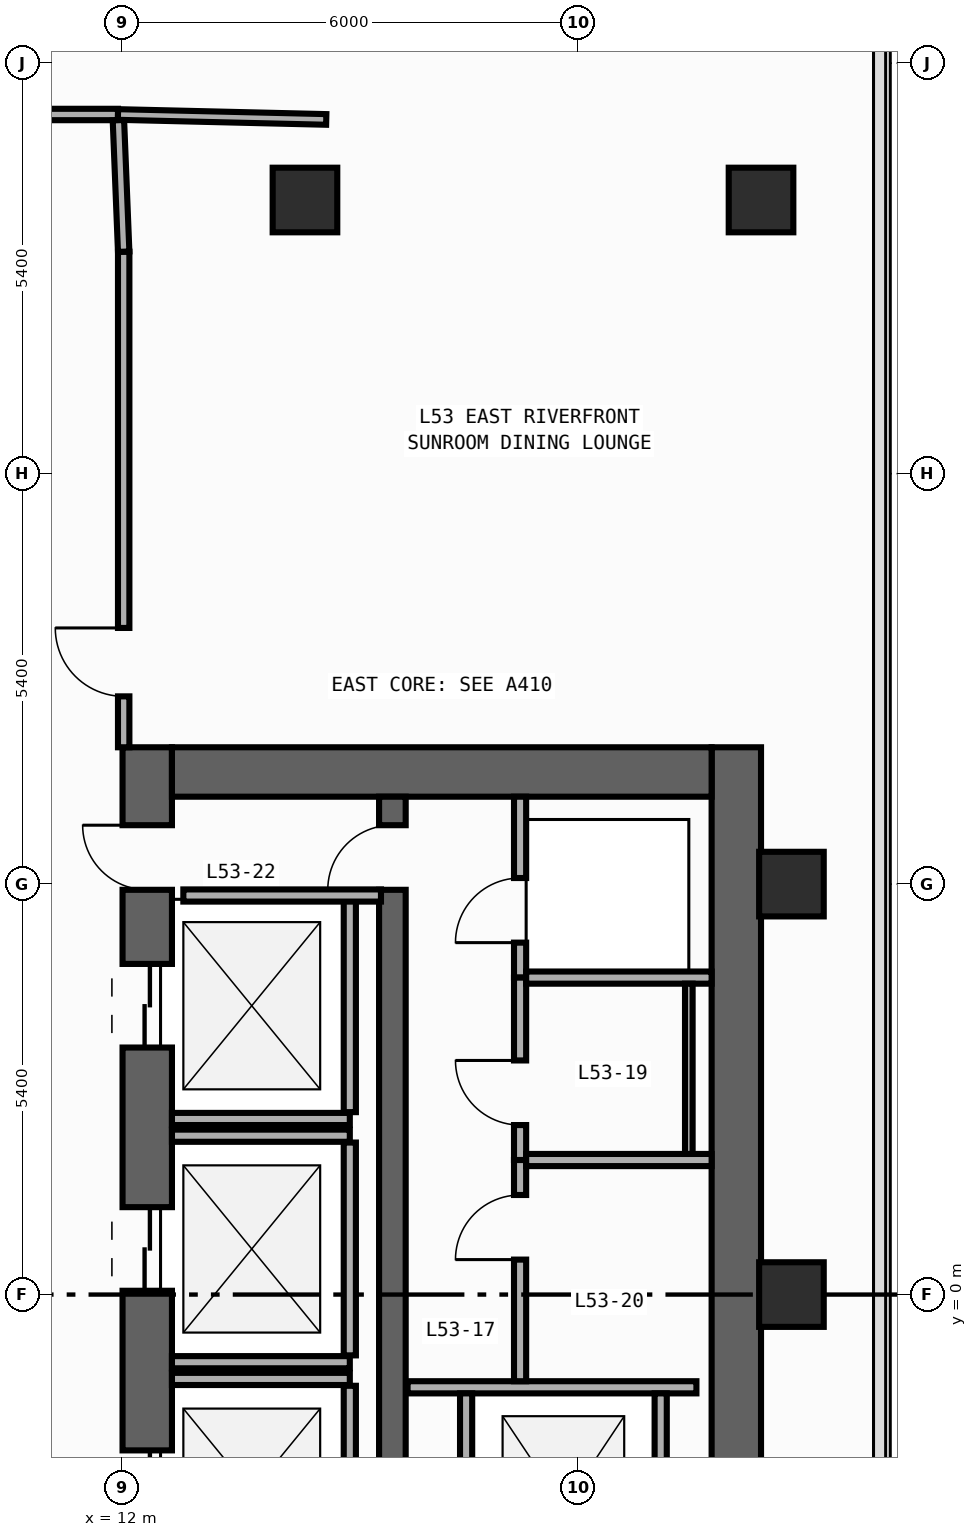
"""IFC4 building model, lengths in metres.
Left out: names, types, materials, properties, quantities, classifications, styles, units other than length and angle.
Written with IfcOpenShell. Run it as: python <this file> out.ifc"""

import sys

from ifc_helpers import new_model, si_unit, direction, frame, frame_2d, origin, origin_2d, place, context, subcontext, project, spatial, rectangle, extrude, element, fill, save


model = new_model("IFC4")
c1 = context("Model", 3, precision=1e-05, world=origin(), true_north=direction((0.0, 1.0)))
c2 = subcontext(c1, "Body", "Model", "MODEL_VIEW")
j1 = project(units=[si_unit("LENGTHUNIT", "METRE"), si_unit("PLANEANGLEUNIT", "RADIAN")], contexts=[c1])
p1 = place(None, origin())
s1 = spatial("IfcSite", under=j1, at=p1, CompositionType="ELEMENT")
p2 = place(p1, origin())
s2 = spatial("IfcBuilding", under=s1, at=p2, CompositionType="ELEMENT")
p3 = place(p2, frame((0.0, 0.0, 229.6)))
s3 = spatial("IfcBuildingStorey", under=s2, at=p3, CompositionType="ELEMENT", Elevation=229.6)
p4 = place(p3, frame((12.325, -19.8, 0.0), z_axis=(0.0, 0.0, 1.0), x_axis=(0.0, 1.0, 0.0)))
e1 = element("IfcWall", 1, at=p4, inside=s3, PredefinedType="SHEAR", context=c2, shape_type="SweptSolid", body=[
    extrude(rectangle(XDim=27.0, YDim=0.65, at=frame_2d((13.5, 0.0))), origin(), (0.0, 0.0, 1.0), 3.34),
])
p5 = place(p4, frame((23.05, 0.0, 0.0)))
e2 = element("IfcOpeningElement", 2, at=p5, cuts=e1, PredefinedType="OPENING", context=c2, shape_type="SweptSolid", body=[
    extrude(rectangle(XDim=1.1, YDim=2.2, at=frame_2d((0.55, 1.1))), frame((0.0, 0.335, 0.0), z_axis=(0.0, -1.0, 0.0), x_axis=(1.0, 0.0, 0.0)), (0.0, 0.0, 1.0), 0.67),
])
p6 = place(p4, frame((19.85, 0.0, 0.0)))
e3 = element("IfcOpeningElement", 3, at=p6, cuts=e1, PredefinedType="OPENING", context=c2, shape_type="SweptSolid", body=[
    extrude(rectangle(XDim=1.1, YDim=2.2, at=frame_2d((0.55, 1.1))), frame((0.0, 0.335, 0.0), z_axis=(0.0, -1.0, 0.0), x_axis=(1.0, 0.0, 0.0)), (0.0, 0.0, 1.0), 0.67),
])
p7 = place(p4, frame((16.65, 0.0, 0.0)))
e4 = element("IfcOpeningElement", 4, at=p7, cuts=e1, PredefinedType="OPENING", context=c2, shape_type="SweptSolid", body=[
    extrude(rectangle(XDim=1.1, YDim=2.2, at=frame_2d((0.55, 1.1))), frame((0.0, 0.335, 0.0), z_axis=(0.0, -1.0, 0.0), x_axis=(1.0, 0.0, 0.0)), (0.0, 0.0, 1.0), 0.67),
])
p8 = place(p4, frame((10.175, 0.0, 0.0)))
e5 = element("IfcOpeningElement", 5, at=p8, cuts=e1, PredefinedType="OPENING", context=c2, shape_type="SweptSolid", body=[
    extrude(rectangle(XDim=0.85, YDim=2.1, at=frame_2d((0.425, 1.05))), frame((0.0, 0.335, 0.0), z_axis=(0.0, -1.0, 0.0), x_axis=(1.0, 0.0, 0.0)), (0.0, 0.0, 1.0), 0.67),
])
p9 = place(p4, frame((12.725, 0.0, 0.0)))
e6 = element("IfcOpeningElement", 6, at=p9, cuts=e1, PredefinedType="OPENING", context=c2, shape_type="SweptSolid", body=[
    extrude(rectangle(XDim=1.15, YDim=2.2, at=frame_2d((0.575, 1.1))), frame((0.0, 0.335, 0.0), z_axis=(0.0, -1.0, 0.0), x_axis=(1.0, 0.0, 0.0)), (0.0, 0.0, 1.0), 0.67),
])
p10 = place(p4, frame((25.125, 0.0, 0.0)))
e7 = element("IfcOpeningElement", 7, at=p10, cuts=e1, PredefinedType="OPENING", context=c2, shape_type="SweptSolid", body=[
    extrude(rectangle(XDim=0.85, YDim=2.1, at=frame_2d((0.425, 1.05))), frame((0.0, 0.335, 0.0), z_axis=(0.0, -1.0, 0.0), x_axis=(1.0, 0.0, 0.0)), (0.0, 0.0, 1.0), 0.67),
])
p11 = place(p3, frame((20.075, -19.8, 0.0), z_axis=(0.0, 0.0, 1.0), x_axis=(0.0, 1.0, 0.0)))
e8 = element("IfcWall", 8, at=p11, inside=s3, PredefinedType="SHEAR", context=c2, shape_type="SweptSolid", body=[
    extrude(rectangle(XDim=27.0, YDim=0.65, at=frame_2d((13.5, 0.0))), origin(), (0.0, 0.0, 1.0), 3.34),
])
p12 = place(p3, frame((12.65, 6.875, 0.0), z_axis=(0.0, 0.0, 1.0), x_axis=(1.0, 0.0, 0.0)))
e9 = element("IfcWall", 9, at=p12, inside=s3, PredefinedType="SHEAR", context=c2, shape_type="SweptSolid", body=[
    extrude(rectangle(XDim=7.1, YDim=0.65, at=frame_2d((3.55, 0.0))), origin(), (0.0, 0.0, 1.0), 3.34),
])
p13 = place(p3, frame((15.55, -19.15, 0.0), z_axis=(0.0, 0.0, 1.0), x_axis=(0.0, 1.0, 0.0)))
e10 = element("IfcWall", 10, at=p13, inside=s3, PredefinedType="SHEAR", context=c2, shape_type="SweptSolid", body=[
    extrude(rectangle(XDim=25.7, YDim=0.35, at=frame_2d((12.85, 0.0))), origin(), (0.0, 0.0, 1.0), 3.34),
])
p14 = place(p13, frame((12.075, 0.0, 0.0)))
e11 = element("IfcOpeningElement", 11, at=p14, cuts=e10, PredefinedType="OPENING", context=c2, shape_type="SweptSolid", body=[
    extrude(rectangle(XDim=1.15, YDim=2.2, at=frame_2d((0.575, 1.1))), frame((0.0, 0.185, 0.0), z_axis=(0.0, -1.0, 0.0), x_axis=(1.0, 0.0, 0.0)), (0.0, 0.0, 1.0), 0.37),
])
p15 = place(p13, frame((24.475, 0.0, 0.0)))
e12 = element("IfcOpeningElement", 12, at=p15, cuts=e10, PredefinedType="OPENING", context=c2, shape_type="SweptSolid", body=[
    extrude(rectangle(XDim=0.85, YDim=2.1, at=frame_2d((0.425, 1.05))), frame((0.0, 0.185, 0.0), z_axis=(0.0, -1.0, 0.0), x_axis=(1.0, 0.0, 0.0)), (0.0, 0.0, 1.0), 0.37),
])
for number, where, z_axis, x_axis in (
    (13, (20.4, 14.4, 0.0), (0.0, 0.0, 1.0), (1.0, 0.0, 0.0)),
    (14, (14.4, 14.4, 0.0), (0.0, 0.0, 1.0), (1.0, 0.0, 0.0)),
    (15, (20.8, 0.0, 0.0), (0.0, 0.0, 1.0), (1.0, 0.0, 0.0)),
    (16, (20.8, 5.4, 0.0), (0.0, 0.0, 1.0), (1.0, 0.0, 0.0)),
):
    element("IfcColumn", number, at=place(p3, frame(where, z_axis=z_axis, x_axis=x_axis)), inside=s3, PredefinedType="COLUMN", context=c2, shape_type="SweptSolid", body=[
        extrude(rectangle(XDim=0.85, YDim=0.85, at=origin_2d()), origin(), (0.0, 0.0, 1.0), 3.6),
    ])
p16 = place(p3, frame((12.65, 2.31, 0.0), z_axis=(0.0, 0.0, 1.0), x_axis=(1.0, 0.0, 0.0)))
e17 = element("IfcWall", 17, at=p16, inside=s3, PredefinedType="STANDARD", context=c2, shape_type="SweptSolid", body=[
    extrude(rectangle(XDim=2.34, YDim=0.16, at=frame_2d((1.17, 0.0))), origin(), (0.0, 0.0, 1.0), 3.34),
])
p17 = place(p3, frame((14.99, 2.4, 0.0), z_axis=(0.0, 0.0, 1.0), x_axis=(0.0, 1.0, 0.0)))
e18 = element("IfcWall", 18, at=p17, inside=s3, PredefinedType="STANDARD", context=c2, shape_type="SweptSolid", body=[
    extrude(rectangle(XDim=2.8, YDim=0.16, at=frame_2d((1.4, 0.0))), origin(), (0.0, 0.0, 1.0), 3.34),
])
for number, where, z_axis, x_axis in (
    (19, (12.65, -0.89, 0.0), (0.0, 0.0, 1.0), (1.0, 0.0, 0.0)),
    (20, (12.65, 2.09, 0.0), (0.0, 0.0, 1.0), (1.0, 0.0, 0.0)),
):
    element("IfcWall", number, at=place(p3, frame(where, z_axis=z_axis, x_axis=x_axis)), inside=s3, PredefinedType="STANDARD", context=c2, shape_type="SweptSolid", body=[
        extrude(rectangle(XDim=2.34, YDim=0.16, at=frame_2d((1.17, 0.0))), origin(), (0.0, 0.0, 1.0), 3.34),
    ])
p18 = place(p3, frame((14.99, -0.8, 0.0), z_axis=(0.0, 0.0, 1.0), x_axis=(0.0, 1.0, 0.0)))
e21 = element("IfcWall", 21, at=p18, inside=s3, PredefinedType="STANDARD", context=c2, shape_type="SweptSolid", body=[
    extrude(rectangle(XDim=2.8, YDim=0.16, at=frame_2d((1.4, 0.0))), origin(), (0.0, 0.0, 1.0), 3.34),
])
p19 = place(p3, frame((12.65, -1.11, 0.0), z_axis=(0.0, 0.0, 1.0), x_axis=(1.0, 0.0, 0.0)))
e22 = element("IfcWall", 22, at=p19, inside=s3, PredefinedType="STANDARD", context=c2, shape_type="SweptSolid", body=[
    extrude(rectangle(XDim=2.34, YDim=0.16, at=frame_2d((1.17, 0.0))), origin(), (0.0, 0.0, 1.0), 3.34),
])
p20 = place(p3, frame((14.99, -4.0, 0.0), z_axis=(0.0, 0.0, 1.0), x_axis=(0.0, 1.0, 0.0)))
e23 = element("IfcWall", 23, at=p20, inside=s3, PredefinedType="STANDARD", context=c2, shape_type="SweptSolid", body=[
    extrude(rectangle(XDim=2.8, YDim=0.16, at=frame_2d((1.4, 0.0))), origin(), (0.0, 0.0, 1.0), 3.34),
])
p21 = place(p3, frame((15.75, -1.22, 0.0), z_axis=(0.0, 0.0, 1.0), x_axis=(1.0, 0.0, 0.0)))
e24 = element("IfcWall", 24, at=p21, inside=s3, PredefinedType="STANDARD", context=c2, shape_type="SweptSolid", body=[
    extrude(rectangle(XDim=3.8, YDim=0.16, at=frame_2d((1.9, 0.0))), origin(), (0.0, 0.0, 1.0), 3.34),
])
for number, where, z_axis, x_axis in (
    (25, (16.52, -4.28, 0.0), (0.0, 0.0, 1.0), (0.0, 1.0, 0.0)),
    (26, (19.08, -4.28, 0.0), (0.0, 0.0, 1.0), (0.0, 1.0, 0.0)),
):
    element("IfcWall", number, at=place(p3, frame(where, z_axis=z_axis, x_axis=x_axis)), inside=s3, PredefinedType="STANDARD", context=c2, shape_type="SweptSolid", body=[
        extrude(rectangle(XDim=2.98, YDim=0.16, at=frame_2d((1.49, 0.0))), origin(), (0.0, 0.0, 1.0), 3.34),
    ])
p22 = place(p3, frame((12.8, 5.25, 0.0), z_axis=(0.0, 0.0, 1.0), x_axis=(1.0, 0.0, 0.0)))
e27 = element("IfcWall", 27, at=p22, inside=s3, PredefinedType="STANDARD", context=c2, shape_type="SweptSolid", body=[
    extrude(rectangle(XDim=2.6, YDim=0.16, at=frame_2d((1.3, 0.0))), origin(), (0.0, 0.0, 1.0), 3.34),
])
p23 = place(p3, frame((17.23, 4.17, 0.0), z_axis=(0.0, 0.0, 1.0), x_axis=(0.0, 1.0, 0.0)))
e28 = element("IfcWall", 28, at=p23, inside=s3, PredefinedType="PARTITIONING", context=c2, shape_type="SweptSolid", body=[
    extrude(rectangle(XDim=2.38, YDim=0.16, at=frame_2d((1.19, 0.0))), origin(), (0.0, 0.0, 1.0), 3.34),
])
p24 = place(p23, frame((0.46, 0.0, 0.0)))
e29 = element("IfcOpeningElement", 29, at=p24, cuts=e28, PredefinedType="OPENING", context=c2, shape_type="SweptSolid", body=[
    extrude(rectangle(XDim=0.85, YDim=2.1, at=frame_2d((0.425, 1.05))), frame((0.0, 0.09, 0.0), z_axis=(0.0, -1.0, 0.0), x_axis=(1.0, 0.0, 0.0)), (0.0, 0.0, 1.0), 0.18),
])
p25 = place(p3, frame((17.23, 1.77, 0.0), z_axis=(0.0, 0.0, 1.0), x_axis=(0.0, 1.0, 0.0)))
e30 = element("IfcWall", 30, at=p25, inside=s3, PredefinedType="PARTITIONING", context=c2, shape_type="SweptSolid", body=[
    extrude(rectangle(XDim=2.4, YDim=0.16, at=frame_2d((1.2, 0.0))), origin(), (0.0, 0.0, 1.0), 3.34),
])
p26 = place(p25, frame((0.46, 0.0, 0.0)))
e31 = element("IfcOpeningElement", 31, at=p26, cuts=e30, PredefinedType="OPENING", context=c2, shape_type="SweptSolid", body=[
    extrude(rectangle(XDim=0.85, YDim=2.1, at=frame_2d((0.425, 1.05))), frame((0.0, 0.09, 0.0), z_axis=(0.0, -1.0, 0.0), x_axis=(1.0, 0.0, 0.0)), (0.0, 0.0, 1.0), 0.18),
])
p27 = place(p3, frame((17.23, -1.14, 0.0), z_axis=(0.0, 0.0, 1.0), x_axis=(0.0, 1.0, 0.0)))
e32 = element("IfcWall", 32, at=p27, inside=s3, PredefinedType="PARTITIONING", context=c2, shape_type="SweptSolid", body=[
    extrude(rectangle(XDim=2.91, YDim=0.16, at=frame_2d((1.455, 0.0))), origin(), (0.0, 0.0, 1.0), 3.34),
])
p28 = place(p27, frame((1.6, 0.0, 0.0)))
e33 = element("IfcOpeningElement", 33, at=p28, cuts=e32, PredefinedType="OPENING", context=c2, shape_type="SweptSolid", body=[
    extrude(rectangle(XDim=0.85, YDim=2.1, at=frame_2d((0.425, 1.05))), frame((0.0, 0.09, 0.0), z_axis=(0.0, -1.0, 0.0), x_axis=(1.0, 0.0, 0.0)), (0.0, 0.0, 1.0), 0.18),
])
for number, where, z_axis, x_axis in (
    (34, (17.31, 4.17, 0.0), (0.0, 0.0, 1.0), (1.0, 0.0, 0.0)),
    (35, (17.31, 1.77, 0.0), (0.0, 0.0, 1.0), (1.0, 0.0, 0.0)),
):
    element("IfcWall", number, at=place(p3, frame(where, z_axis=z_axis, x_axis=x_axis)), inside=s3, PredefinedType="PARTITIONING", context=c2, shape_type="SweptSolid", body=[
        extrude(rectangle(XDim=2.44, YDim=0.16, at=frame_2d((1.22, 0.0))), origin(), (0.0, 0.0, 1.0), 3.34),
    ])
p29 = place(p3, frame((12.015, 7.2, 0.0), z_axis=(0.0, 0.0, 1.0), x_axis=(0.0, 1.0, 0.0)))
e36 = element("IfcWall", 36, at=p29, inside=s3, PredefinedType="PARTITIONING", context=c2, shape_type="SweptSolid", body=[
    extrude(rectangle(XDim=6.52, YDim=0.15, at=frame_2d((3.26, 0.0))), origin(), (0.0, 0.0, 1.0), 3.34),
])
p30 = place(p29, frame((0.67, 0.0, 0.0)))
e37 = element("IfcOpeningElement", 37, at=p30, cuts=e36, PredefinedType="OPENING", context=c2, shape_type="SweptSolid", body=[
    extrude(rectangle(XDim=0.9, YDim=2.15, at=frame_2d((0.45, 1.075))), frame((0.0, 0.085, 0.0), z_axis=(0.0, -1.0, 0.0), x_axis=(1.0, 0.0, 0.0)), (0.0, 0.0, 1.0), 0.17),
])
p31 = place(p3, frame((10.56, 15.525, 0.0), z_axis=(0.0, 0.0, 1.0), x_axis=(1.0, 0.0, 0.0)))
e38 = element("IfcWall", 38, at=p31, inside=s3, PredefinedType="PARTITIONING", context=c2, shape_type="SweptSolid", body=[
    extrude(rectangle(XDim=1.38, YDim=0.15, at=frame_2d((0.69, 0.0))), origin(), (0.0, 0.0, 1.0), 3.34),
])
p32 = place(p3, frame((12.015, 13.72, 0.0), z_axis=(0.0, 0.0, 1.0), x_axis=(-0.040046877756, 0.99919780203, 0.0)))
e39 = element("IfcWall", 39, at=p32, inside=s3, PredefinedType="PARTITIONING", context=c2, shape_type="SweptSolid", body=[
    extrude(rectangle(XDim=1.731, YDim=0.15, at=frame_2d((0.866, 0.0))), origin(), (0.0, 0.0, 1.0), 3.34),
])
p33 = place(p3, frame((11.94, 15.525, 0.0), z_axis=(0.0, 0.0, 1.0), x_axis=(0.999719241816, -0.023694673289, 0.0)))
e40 = element("IfcWall", 40, at=p33, inside=s3, PredefinedType="PARTITIONING", context=c2, shape_type="SweptSolid", body=[
    extrude(rectangle(XDim=2.741, YDim=0.14, at=frame_2d((1.37, 0.0))), origin(), (0.0, 0.0, 1.0), 3.34),
])
p34 = place(p3, frame((19.45, 4.09, 0.0), z_axis=(0.0, 0.0, 1.0), x_axis=(0.0, -1.0, 0.0)))
e41 = element("IfcWall", 41, at=p34, inside=s3, PredefinedType="PARTITIONING", context=c2, shape_type="SweptSolid", body=[
    extrude(rectangle(XDim=2.24, YDim=0.1, at=frame_2d((1.12, 0.0))), origin(), (0.0, 0.0, 1.0), 3.34),
])
p35 = place(p5, origin())
e42 = element("IfcDoor", 42, at=p35, inside=s3, OperationType="DOUBLE_DOOR_SLIDING", PredefinedType="DOOR", context=c2, shape_type="SweptSolid", body=[
    extrude(rectangle(XDim=1.1, YDim=2.2, at=frame_2d((0.55, 1.1))), frame((0.0, 0.025, 0.0), z_axis=(0.0, -1.0, 0.0), x_axis=(1.0, 0.0, 0.0)), (0.0, 0.0, 1.0), 0.05),
])
fill(e2, e42)
p36 = place(p6, origin())
e43 = element("IfcDoor", 43, at=p36, inside=s3, OperationType="DOUBLE_DOOR_SLIDING", PredefinedType="DOOR", context=c2, shape_type="SweptSolid", body=[
    extrude(rectangle(XDim=1.1, YDim=2.2, at=frame_2d((0.55, 1.1))), frame((0.0, 0.025, 0.0), z_axis=(0.0, -1.0, 0.0), x_axis=(1.0, 0.0, 0.0)), (0.0, 0.0, 1.0), 0.05),
])
fill(e3, e43)
p37 = place(p7, origin())
e44 = element("IfcDoor", 44, at=p37, inside=s3, OperationType="DOUBLE_DOOR_SLIDING", PredefinedType="DOOR", context=c2, shape_type="SweptSolid", body=[
    extrude(rectangle(XDim=1.1, YDim=2.2, at=frame_2d((0.55, 1.1))), frame((0.0, 0.025, 0.0), z_axis=(0.0, -1.0, 0.0), x_axis=(1.0, 0.0, 0.0)), (0.0, 0.0, 1.0), 0.05),
])
fill(e4, e44)
p38 = place(p10, origin())
e45 = element("IfcDoor", 45, at=p38, inside=s3, OperationType="SINGLE_SWING_RIGHT", PredefinedType="DOOR", context=c2, shape_type="SweptSolid", body=[
    extrude(rectangle(XDim=0.85, YDim=2.1, at=frame_2d((0.425, 1.05))), frame((0.0, 0.025, 0.0), z_axis=(0.0, -1.0, 0.0), x_axis=(1.0, 0.0, 0.0)), (0.0, 0.0, 1.0), 0.05),
])
fill(e7, e45)
p39 = place(p15, origin())
e46 = element("IfcDoor", 46, at=p39, inside=s3, OperationType="SINGLE_SWING_LEFT", PredefinedType="DOOR", context=c2, shape_type="SweptSolid", body=[
    extrude(rectangle(XDim=0.85, YDim=2.1, at=frame_2d((0.425, 1.05))), frame((0.0, 0.025, 0.0), z_axis=(0.0, -1.0, 0.0), x_axis=(1.0, 0.0, 0.0)), (0.0, 0.0, 1.0), 0.05),
])
fill(e12, e46)
p40 = place(p24, origin())
e47 = element("IfcDoor", 47, at=p40, inside=s3, OperationType="SINGLE_SWING_LEFT", PredefinedType="DOOR", context=c2, shape_type="SweptSolid", body=[
    extrude(rectangle(XDim=0.85, YDim=2.1, at=frame_2d((0.425, 1.05))), frame((0.0, 0.025, 0.0), z_axis=(0.0, -1.0, 0.0), x_axis=(1.0, 0.0, 0.0)), (0.0, 0.0, 1.0), 0.05),
])
fill(e29, e47)
p41 = place(p26, origin())
e48 = element("IfcDoor", 48, at=p41, inside=s3, OperationType="SINGLE_SWING_RIGHT", PredefinedType="DOOR", context=c2, shape_type="SweptSolid", body=[
    extrude(rectangle(XDim=0.85, YDim=2.1, at=frame_2d((0.425, 1.05))), frame((0.0, 0.025, 0.0), z_axis=(0.0, -1.0, 0.0), x_axis=(1.0, 0.0, 0.0)), (0.0, 0.0, 1.0), 0.05),
])
fill(e31, e48)
p42 = place(p28, origin())
e49 = element("IfcDoor", 49, at=p42, inside=s3, OperationType="SINGLE_SWING_LEFT", PredefinedType="DOOR", context=c2, shape_type="SweptSolid", body=[
    extrude(rectangle(XDim=0.85, YDim=2.1, at=frame_2d((0.425, 1.05))), frame((0.0, 0.025, 0.0), z_axis=(0.0, -1.0, 0.0), x_axis=(1.0, 0.0, 0.0)), (0.0, 0.0, 1.0), 0.05),
])
fill(e33, e49)
p43 = place(p30, origin())
e50 = element("IfcDoor", 50, at=p43, inside=s3, OperationType="SINGLE_SWING_RIGHT", PredefinedType="DOOR", context=c2, shape_type="SweptSolid", body=[
    extrude(rectangle(XDim=0.9, YDim=2.15, at=frame_2d((0.45, 1.075))), frame((0.0, 0.025, 0.0), z_axis=(0.0, -1.0, 0.0), x_axis=(1.0, 0.0, 0.0)), (0.0, 0.0, 1.0), 0.05),
])
fill(e37, e50)
save(model, sys.argv[1])
